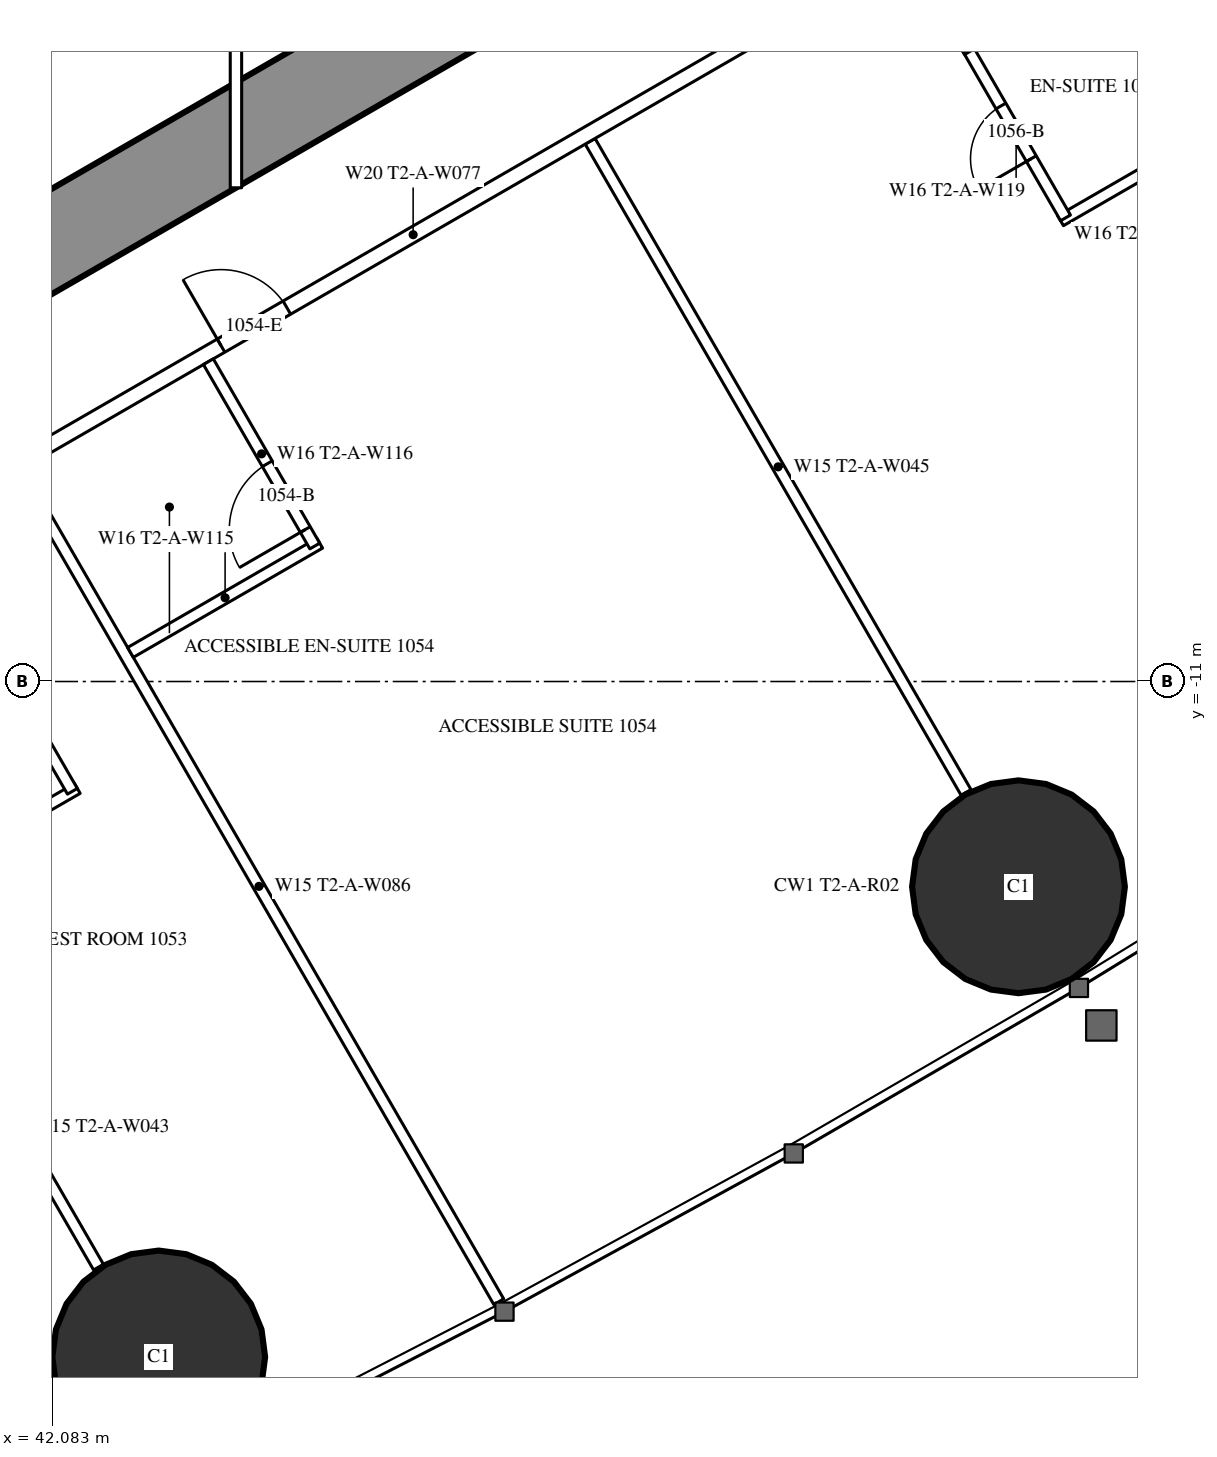
"""IFC4 building model, lengths in metres.
Left out: names, types, materials, properties, quantities, classifications, styles, units other than length and angle.
Written with IfcOpenShell. Run it as: python <this file> out.ifc"""

import sys

from ifc_helpers import new_model, si_unit, direction, frame, frame_2d, origin, origin_2d, place, context, subcontext, project, spatial, rectangle, hollow_circle, extrude, element, fill, save


model = new_model("IFC4")
c1 = context("Model", 3, precision=1e-05, world=origin(), true_north=direction((0.0, 1.0)))
c2 = subcontext(c1, "Body", "Model", "MODEL_VIEW")
j1 = project(units=[si_unit("LENGTHUNIT", "METRE"), si_unit("PLANEANGLEUNIT", "RADIAN")], contexts=[c1])
p1 = place(None, origin())
s1 = spatial("IfcSite", under=j1, at=p1, CompositionType="ELEMENT")
p2 = place(p1, origin())
s2 = spatial("IfcBuilding", under=s1, at=p2, CompositionType="ELEMENT")
p3 = place(p2, frame((0.0, 0.0, 42.5)))
s3 = spatial("IfcBuildingStorey", under=s2, at=p3, CompositionType="ELEMENT", Elevation=42.5)
for number, where, z_axis, x_axis in (
    (1, (43.484, -19.886, 0.0), (0.0, 0.0, 1.0), (1.0, 0.0, 0.0)),
    (2, (54.795, -13.701, 0.0), (0.0, 0.0, 1.0), (1.0, 0.0, 0.0)),
):
    element("IfcColumn", number, at=place(p3, frame(where, z_axis=z_axis, x_axis=x_axis)), inside=s3, PredefinedType="COLUMN", context=c2, shape_type="SweptSolid", body=[
        extrude(hollow_circle(Radius=1.4, WallThickness=0.12, at=origin_2d()), origin(), (0.0, 0.0, 1.0), 3.5),
    ])
p4 = place(p3, frame((27.2, -13.8, 0.0), z_axis=(0.0, 0.0, 1.0), x_axis=(0.866027159892, 0.499996958321, 0.0)))
e3 = element("IfcWall", 3, at=p4, inside=s3, PredefinedType="SHEAR", context=c2, shape_type="SweptSolid", body=[
    extrude(rectangle(XDim=27.947, YDim=1.2, at=frame_2d((13.973, 0.0))), origin(), (0.0, 0.0, 1.0), 3.5),
])
p5 = place(p4, frame((4.6, 0.0, 0.0)))
e4 = element("IfcOpeningElement", 4, at=p5, cuts=e3, PredefinedType="OPENING", context=c2, shape_type="SweptSolid", body=[
    extrude(rectangle(XDim=1.0, YDim=2.2, at=frame_2d((0.5, 1.1))), frame((0.0, 0.61, 0.0), z_axis=(0.0, -1.0, 0.0), x_axis=(1.0, 0.0, 0.0)), (0.0, 0.0, 1.0), 1.22),
])
p6 = place(p4, frame((13.395, 0.0, 0.0)))
e5 = element("IfcOpeningElement", 5, at=p6, cuts=e3, PredefinedType="OPENING", context=c2, shape_type="SweptSolid", body=[
    extrude(rectangle(XDim=1.8, YDim=2.2, at=frame_2d((0.9, 1.1))), frame((0.0, 0.61, 0.0), z_axis=(0.0, -1.0, 0.0), x_axis=(1.0, 0.0, 0.0)), (0.0, 0.0, 1.0), 1.22),
])
p7 = place(p3, frame((41.647, -8.23, 0.0), z_axis=(0.0, 0.0, 1.0), x_axis=(0.49998590462, -0.866033541603, 0.0)))
e6 = element("IfcWall", 6, at=p7, inside=s3, PredefinedType="PARTITIONING", context=c2, shape_type="SweptSolid", body=[
    extrude(rectangle(XDim=12.621, YDim=0.15, at=frame_2d((6.311, 0.0))), origin(), (0.0, 0.0, 1.0), 3.25),
])
p8 = place(p3, frame((49.159, -3.893, 0.0), z_axis=(0.0, 0.0, 1.0), x_axis=(0.499998773722, -0.866026111775, 0.0)))
e7 = element("IfcWall", 7, at=p8, inside=s3, PredefinedType="PARTITIONING", context=c2, shape_type="SweptSolid", body=[
    extrude(rectangle(XDim=9.892, YDim=0.15, at=frame_2d((4.946, 0.0))), origin(), (0.0, 0.0, 1.0), 2.25),
])
p9 = place(p3, frame((40.57, -15.03, 0.0), z_axis=(0.0, 0.0, 1.0), x_axis=(0.500012993597, -0.866017901798, 0.0)))
e8 = element("IfcWall", 8, at=p9, inside=s3, PredefinedType="PARTITIONING", context=c2, shape_type="SweptSolid", body=[
    extrude(rectangle(XDim=4.243, YDim=0.15, at=frame_2d((2.122, 0.0))), origin(), (0.0, 0.0, 1.0), 3.25),
])
p10 = place(p3, frame((37.96, -10.243, 0.0), z_axis=(0.0, 0.0, 1.0), x_axis=(0.866026429433, 0.499998223521, 0.0)))
e9 = element("IfcWall", 9, at=p10, inside=s3, PredefinedType="PARTITIONING", context=c2, shape_type="SweptSolid", body=[
    extrude(rectangle(XDim=20.487, YDim=0.2, at=frame_2d((10.243, 0.0))), origin(), (0.0, 0.0, 1.0), 3.25),
])
p11 = place(p10, frame((7.325, 0.0, 0.0)))
e10 = element("IfcOpeningElement", 10, at=p11, cuts=e9, PredefinedType="OPENING", context=c2, shape_type="SweptSolid", body=[
    extrude(rectangle(XDim=1.0, YDim=2.2, at=frame_2d((0.5, 1.1))), frame((0.0, 0.11, 0.0), z_axis=(0.0, -1.0, 0.0), x_axis=(1.0, 0.0, 0.0)), (0.0, 0.0, 1.0), 0.22),
])
p12 = place(p10, frame((18.937, 0.0, 0.0)))
e11 = element("IfcOpeningElement", 11, at=p12, cuts=e9, PredefinedType="OPENING", context=c2, shape_type="SweptSolid", body=[
    extrude(rectangle(XDim=0.95, YDim=2.2, at=frame_2d((0.475, 1.1))), frame((0.0, 0.11, 0.0), z_axis=(0.0, -1.0, 0.0), x_axis=(1.0, 0.0, 0.0)), (0.0, 0.0, 1.0), 0.22),
])
p13 = place(p10, frame((0.6, 0.0, 0.0)))
e12 = element("IfcOpeningElement", 12, at=p13, cuts=e9, PredefinedType="OPENING", context=c2, shape_type="SweptSolid", body=[
    extrude(rectangle(XDim=0.95, YDim=2.2, at=frame_2d((0.475, 1.1))), frame((0.0, 0.11, 0.0), z_axis=(0.0, -1.0, 0.0), x_axis=(1.0, 0.0, 0.0)), (0.0, 0.0, 1.0), 0.22),
])
p14 = place(p3, frame((43.112, -10.617, 0.0), z_axis=(0.0, 0.0, 1.0), x_axis=(0.866018712932, 0.500011588718, 0.0)))
e13 = element("IfcWall", 13, at=p14, inside=s3, PredefinedType="PARTITIONING", context=c2, shape_type="SweptSolid", body=[
    extrude(rectangle(XDim=2.875, YDim=0.15, at=frame_2d((1.438, 0.0))), origin(), (0.0, 0.0, 1.0), 3.25),
])
p15 = place(p3, frame((44.137, -6.792, 0.0), z_axis=(0.0, 0.0, 1.0), x_axis=(0.49994636267, -0.866056369097, 0.0)))
e14 = element("IfcWall", 14, at=p15, inside=s3, PredefinedType="PARTITIONING", context=c2, shape_type="SweptSolid", body=[
    extrude(rectangle(XDim=2.8, YDim=0.15, at=frame_2d((1.4, 0.0))), origin(), (0.0, 0.0, 1.0), 3.25),
])
p16 = place(p15, frame((1.55, 0.0, 0.0)))
e15 = element("IfcOpeningElement", 15, at=p16, cuts=e14, PredefinedType="OPENING", context=c2, shape_type="SweptSolid", body=[
    extrude(rectangle(XDim=1.0, YDim=2.2, at=frame_2d((0.5, 1.1))), frame((0.0, 0.085, 0.0), z_axis=(0.0, -1.0, 0.0), x_axis=(1.0, 0.0, 0.0)), (0.0, 0.0, 1.0), 0.17),
])
p17 = place(p3, frame((55.349, -4.938, 0.0), z_axis=(0.0, 0.0, 1.0), x_axis=(0.866006523861, 0.500032699561, 0.0)))
e16 = element("IfcWall", 16, at=p17, inside=s3, PredefinedType="PARTITIONING", context=c2, shape_type="SweptSolid", body=[
    extrude(rectangle(XDim=2.475, YDim=0.15, at=frame_2d((1.237, 0.0))), origin(), (0.0, 0.0, 1.0), 3.25),
])
p18 = place(p3, frame((54.114, -2.649, 0.0), z_axis=(0.0, 0.0, 1.0), x_axis=(0.500006934395, -0.866021400173, 0.0)))
e17 = element("IfcWall", 17, at=p18, inside=s3, PredefinedType="PARTITIONING", context=c2, shape_type="SweptSolid", body=[
    extrude(rectangle(XDim=2.6, YDim=0.15, at=frame_2d((1.3, 0.0))), origin(), (0.0, 0.0, 1.0), 3.25),
])
p19 = place(p18, frame((0.9, 0.0, 0.0)))
e18 = element("IfcOpeningElement", 18, at=p19, cuts=e17, PredefinedType="OPENING", context=c2, shape_type="SweptSolid", body=[
    extrude(rectangle(XDim=0.8, YDim=2.2, at=frame_2d((0.4, 1.1))), frame((0.0, 0.085, 0.0), z_axis=(0.0, -1.0, 0.0), x_axis=(1.0, 0.0, 0.0)), (0.0, 0.0, 1.0), 0.17),
])
p20 = place(p3, frame((54.049, -2.687, 0.0), z_axis=(0.0, 0.0, 1.0), x_axis=(0.866006523861, 0.500032699561, 0.0)))
e19 = element("IfcWall", 19, at=p20, inside=s3, PredefinedType="PARTITIONING", context=c2, shape_type="SweptSolid", body=[
    extrude(rectangle(XDim=2.475, YDim=0.15, at=frame_2d((1.237, 0.0))), origin(), (0.0, 0.0, 1.0), 3.25),
])
p21 = place(p3, frame((40.27, -13.644, 0.0), z_axis=(0.0, 0.0, 1.0), x_axis=(0.866031185235, 0.4999899861, 0.0)))
e20 = element("IfcWall", 20, at=p21, inside=s3, PredefinedType="PARTITIONING", context=c2, shape_type="SweptSolid", body=[
    extrude(rectangle(XDim=2.475, YDim=0.15, at=frame_2d((1.238, 0.0))), origin(), (0.0, 0.0, 1.0), 3.25),
])
p22 = place(p3, frame((41.048, -10.193, 0.0), z_axis=(0.0, 0.0, 1.0), x_axis=(0.500047596559, -0.865997922154, 0.0)))
e21 = element("IfcWall", 21, at=p22, inside=s3, PredefinedType="PARTITIONING", context=c2, shape_type="SweptSolid", body=[
    extrude(rectangle(XDim=2.6, YDim=0.15, at=frame_2d((1.3, 0.0))), origin(), (0.0, 0.0, 1.0), 3.25),
])
p23 = place(p22, frame((0.9, 0.0, 0.0)))
e22 = element("IfcOpeningElement", 22, at=p23, cuts=e21, PredefinedType="OPENING", context=c2, shape_type="SweptSolid", body=[
    extrude(rectangle(XDim=0.8, YDim=2.2, at=frame_2d((0.4, 1.1))), frame((0.0, 0.085, 0.0), z_axis=(0.0, -1.0, 0.0), x_axis=(1.0, 0.0, 0.0)), (0.0, 0.0, 1.0), 0.17),
])
p24 = place(p3, frame((44.5, -4.505, 0.0), z_axis=(0.0, 0.0, 1.0), x_axis=(0.0, 1.0, 0.0)))
e23 = element("IfcWall", 23, at=p24, inside=s3, PredefinedType="PARTITIONING", context=c2, shape_type="SweptSolid", body=[
    extrude(rectangle(XDim=9.009, YDim=0.15, at=frame_2d((4.505, 0.0))), origin(), (0.0, 0.0, 1.0), 2.45),
])
p25 = place(p24, frame((4.005, 0.0, 0.0)))
e24 = element("IfcOpeningElement", 24, at=p25, cuts=e23, PredefinedType="OPENING", context=c2, shape_type="SweptSolid", body=[
    extrude(rectangle(XDim=1.0, YDim=2.2, at=frame_2d((0.5, 1.1))), frame((0.0, 0.085, 0.0), z_axis=(0.0, -1.0, 0.0), x_axis=(1.0, 0.0, 0.0)), (0.0, 0.0, 1.0), 0.17),
])
p26 = place(p16, origin())
e25 = element("IfcDoor", 25, at=p26, inside=s3, OperationType="SINGLE_SWING_RIGHT", PredefinedType="DOOR", context=c2, shape_type="SweptSolid", body=[
    extrude(rectangle(XDim=1.0, YDim=2.2, at=frame_2d((0.5, 1.1))), frame((0.0, 0.025, 0.0), z_axis=(0.0, -1.0, 0.0), x_axis=(1.0, 0.0, 0.0)), (0.0, 0.0, 1.0), 0.05),
])
fill(e15, e25)
p27 = place(p11, origin())
e26 = element("IfcDoor", 26, at=p27, inside=s3, OperationType="SINGLE_SWING_LEFT", PredefinedType="DOOR", context=c2, shape_type="SweptSolid", body=[
    extrude(rectangle(XDim=1.0, YDim=2.2, at=frame_2d((0.5, 1.1))), frame((0.0, 0.025, 0.0), z_axis=(0.0, -1.0, 0.0), x_axis=(1.0, 0.0, 0.0)), (0.0, 0.0, 1.0), 0.05),
])
fill(e10, e26)
p28 = place(p19, origin())
e27 = element("IfcDoor", 27, at=p28, inside=s3, OperationType="SINGLE_SWING_RIGHT", PredefinedType="DOOR", context=c2, shape_type="SweptSolid", body=[
    extrude(rectangle(XDim=0.8, YDim=2.2, at=frame_2d((0.4, 1.1))), frame((0.0, 0.025, 0.0), z_axis=(0.0, -1.0, 0.0), x_axis=(1.0, 0.0, 0.0)), (0.0, 0.0, 1.0), 0.05),
])
fill(e18, e27)
save(model, sys.argv[1])
